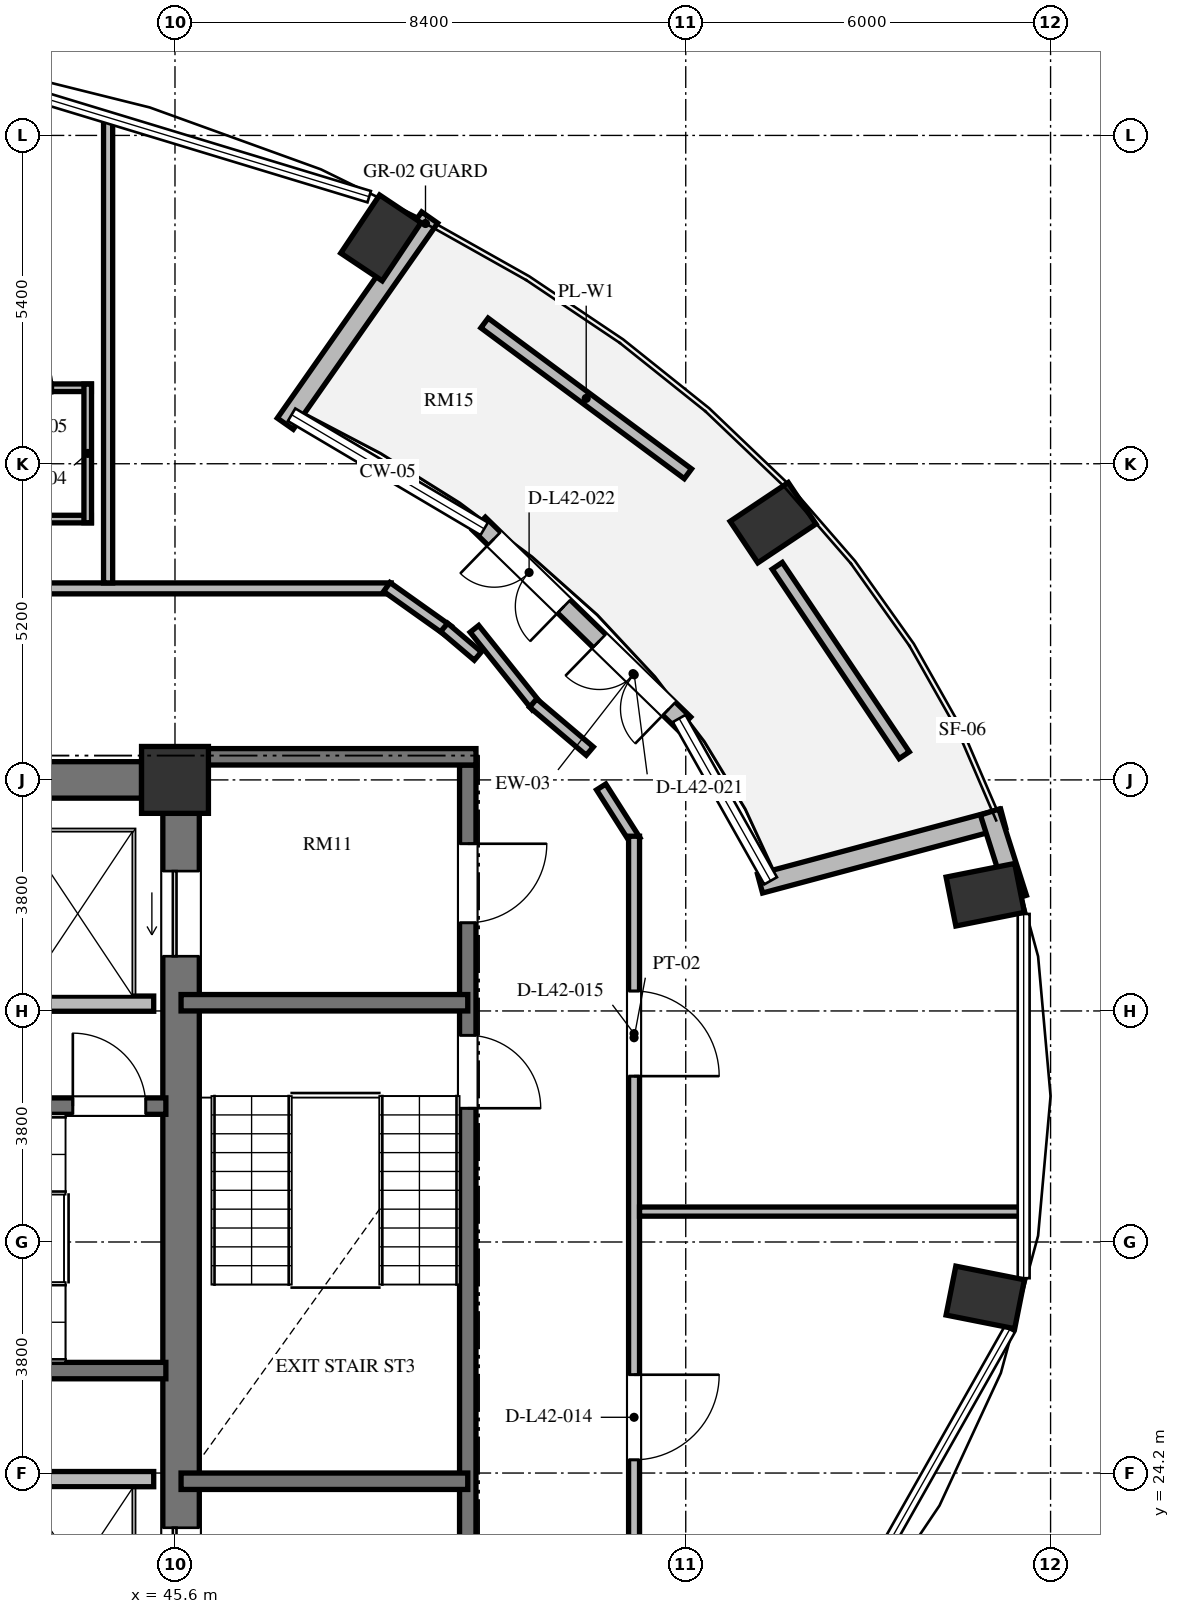
"""IFC4 building model, lengths in metres.
Left out: names, types, materials, properties, quantities, classifications, styles, units other than length and angle.
Written with IfcOpenShell. Run it as: python <this file> out.ifc"""

import sys

from ifc_helpers import new_model, si_unit, direction, frame, frame_2d, origin, origin_2d, place, context, subcontext, project, spatial, rectangle, extrude, element, fill, save


model = new_model("IFC4")
c1 = context("Model", 3, precision=1e-05, world=origin(), true_north=direction((0.0, 1.0)))
c2 = subcontext(c1, "Body", "Model", "MODEL_VIEW")
j1 = project(units=[si_unit("LENGTHUNIT", "METRE"), si_unit("PLANEANGLEUNIT", "RADIAN")], contexts=[c1])
p1 = place(None, origin())
s1 = spatial("IfcSite", under=j1, at=p1, CompositionType="ELEMENT")
p2 = place(p1, origin())
s2 = spatial("IfcBuilding", under=s1, at=p2, CompositionType="ELEMENT")
p3 = place(p2, frame((0.0, 0.0, 163.824)))
s3 = spatial("IfcBuildingStorey", under=s2, at=p3, CompositionType="ELEMENT", Elevation=163.824)
for number, where, z_axis, x_axis in (
    (1, (58.926, 27.088, 0.0), (0.0, 0.0, 1.0), (0.981, -0.195, 0.0)),
    (2, (58.926, 33.712, 0.0), (0.0, 0.0, 1.0), (0.981, 0.195, 0.0)),
    (3, (55.436, 39.831, 0.0), (0.0, 0.0, 1.0), (0.831, 0.556, 0.0)),
    (4, (48.987, 44.514, 0.0), (0.0, 0.0, 1.0), (0.556, 0.831, 0.0)),
):
    element("IfcColumn", number, at=place(p3, frame(where, z_axis=z_axis, x_axis=x_axis)), inside=s3, PredefinedType="COLUMN", context=c2, shape_type="SweptSolid", body=[
        extrude(rectangle(XDim=1.15, YDim=0.82, at=origin_2d()), origin(), (0.0, 0.0, 1.0), 3.648),
    ])
p4 = place(p3, frame((45.6, 35.6, 0.0), z_axis=(0.0, 0.0, 1.0), x_axis=(1.0, 0.0, 0.0)))
e5 = element("IfcColumn", 5, at=p4, inside=s3, PredefinedType="COLUMN", context=c2, shape_type="SweptSolid", body=[
    extrude(rectangle(XDim=1.1, YDim=1.1, at=origin_2d()), origin(), (0.0, 0.0, 1.0), 3.648),
])
p5 = place(p3, frame((45.7, 20.95, 0.0), z_axis=(0.0, 0.0, 1.0), x_axis=(0.0, 1.0, 0.0)))
e6 = element("IfcWall", 6, at=p5, inside=s3, PredefinedType="SHEAR", context=c2, shape_type="SweptSolid", body=[
    extrude(rectangle(XDim=14.1, YDim=0.6, at=frame_2d((7.05, 0.0))), origin(), (0.0, 0.0, 1.0), 3.648),
])
p6 = place(p5, frame((11.75, 0.0, 0.0)))
e7 = element("IfcOpeningElement", 7, at=p6, cuts=e6, PredefinedType="OPENING", context=c2, shape_type="SweptSolid", body=[
    extrude(rectangle(XDim=1.4, YDim=2.3, at=frame_2d((0.7, 1.15))), frame((0.0, 0.31, 0.0), z_axis=(0.0, -1.0, 0.0), x_axis=(1.0, 0.0, 0.0)), (0.0, 0.0, 1.0), 0.62),
])
p7 = place(p5, frame((0.95, 0.0, 0.0)))
e8 = element("IfcOpeningElement", 8, at=p7, cuts=e6, PredefinedType="OPENING", context=c2, shape_type="SweptSolid", body=[
    extrude(rectangle(XDim=1.4, YDim=2.3, at=frame_2d((0.7, 1.15))), frame((0.0, 0.31, 0.0), z_axis=(0.0, -1.0, 0.0), x_axis=(1.0, 0.0, 0.0)), (0.0, 0.0, 1.0), 0.62),
])
p8 = place(p3, frame((39.675, 35.6, 0.0), z_axis=(0.0, 0.0, 1.0), x_axis=(1.0, 0.0, 0.0)))
e9 = element("IfcWall", 9, at=p8, inside=s3, PredefinedType="SHEAR", context=c2, shape_type="SweptSolid", body=[
    extrude(rectangle(XDim=5.375, YDim=0.6, at=frame_2d((2.688, 0.0))), origin(), (0.0, 0.0, 1.0), 3.648),
])
p9 = place(p3, frame((53.977, 36.527, 0.0), z_axis=(0.0, 0.0, 1.0), x_axis=(-0.716702137791, 0.697379413007, 0.0)))
e10 = element("IfcWall", 10, at=p9, inside=s3, PredefinedType="SOLIDWALL", context=c2, shape_type="SweptSolid", body=[
    extrude(rectangle(XDim=4.713, YDim=0.3, at=frame_2d((2.356, 0.0))), origin(), (0.0, 0.0, 1.0), 3.428),
])
p10 = place(p9, frame((0.35, 0.0, 0.02)))
e11 = element("IfcOpeningElement", 11, at=p10, cuts=e10, PredefinedType="OPENING", context=c2, shape_type="SweptSolid", body=[
    extrude(rectangle(XDim=1.6, YDim=2.3, at=frame_2d((0.8, 1.15))), frame((0.0, 0.16, 0.0), z_axis=(0.0, -1.0, 0.0), x_axis=(1.0, 0.0, 0.0)), (0.0, 0.0, 1.0), 0.32),
])
p11 = place(p9, frame((2.763, 0.0, 0.02)))
e12 = element("IfcOpeningElement", 12, at=p11, cuts=e10, PredefinedType="OPENING", context=c2, shape_type="SweptSolid", body=[
    extrude(rectangle(XDim=1.6, YDim=2.3, at=frame_2d((0.8, 1.15))), frame((0.0, 0.16, 0.0), z_axis=(0.0, -1.0, 0.0), x_axis=(1.0, 0.0, 0.0)), (0.0, 0.0, 1.0), 0.32),
])
p12 = place(p3, frame((59.221, 34.966, 0.0), z_axis=(0.0, 0.0, 1.0), x_axis=(-0.965925940868, -0.258818617489, 0.0)))
e13 = element("IfcWall", 13, at=p12, inside=s3, PredefinedType="SOLIDWALL", context=c2, shape_type="SweptSolid", body=[
    extrude(rectangle(XDim=4.14, YDim=0.32, at=frame_2d((2.07, 0.0))), origin(), (0.0, 0.0, 1.0), 3.428),
])
p13 = place(p3, frame((49.789, 44.85, 0.0), z_axis=(0.0, 0.0, 1.0), x_axis=(-0.57355337011, -0.819168194961, 0.0)))
e14 = element("IfcWall", 14, at=p13, inside=s3, PredefinedType="SOLIDWALL", context=c2, shape_type="SweptSolid", body=[
    extrude(rectangle(XDim=4.14, YDim=0.32, at=frame_2d((2.07, 0.0))), origin(), (0.0, 0.0, 1.0), 3.428),
])
p14 = place(p3, frame((59.45, 33.654, 0.0), z_axis=(0.0, 0.0, 1.0), x_axis=(-0.303745470451, 0.952753215256, 0.0)))
e15 = element("IfcWall", 15, at=p14, inside=s3, PredefinedType="SOLIDWALL", context=c2, shape_type="SweptSolid", body=[
    extrude(rectangle(XDim=1.488, YDim=0.32, at=frame_2d((0.744, 0.0))), origin(), (0.0, 0.0, 1.0), 3.428),
])
p15 = place(p3, frame((57.593, 36.006, 0.0), z_axis=(0.0, 0.0, 1.0), x_axis=(-0.556861629804, 0.830605276441, 0.0)))
e16 = element("IfcWall", 16, at=p15, inside=s3, PredefinedType="PARAPET", context=c2, shape_type="SweptSolid", body=[
    extrude(rectangle(XDim=3.75, YDim=0.2, at=frame_2d((1.875, 0.0))), origin(), (0.0, 0.0, 1.0), 0.55),
])
p16 = place(p3, frame((54.035, 40.635, 0.0), z_axis=(0.0, 0.0, 1.0), x_axis=(-0.803273565066, 0.595610258194, 0.0)))
e17 = element("IfcWall", 17, at=p16, inside=s3, PredefinedType="PARAPET", context=c2, shape_type="SweptSolid", body=[
    extrude(rectangle(XDim=4.164, YDim=0.2, at=frame_2d((2.082, 0.0))), origin(), (0.0, 0.0, 1.0), 0.55),
])
p17 = place(p3, frame((37.465, 30.235, 0.0), z_axis=(0.0, 0.0, 1.0), x_axis=(1.0, 0.0, 0.0)))
e18 = element("IfcWall", 18, at=p17, inside=s3, PredefinedType="SHEAR", context=c2, shape_type="SweptSolid", body=[
    extrude(rectangle(XDim=7.985, YDim=0.27, at=frame_2d((3.992, 0.0))), origin(), (0.0, 0.0, 1.0), 3.648),
])
p18 = place(p17, frame((6.455, 0.0, 0.0)))
e19 = element("IfcOpeningElement", 19, at=p18, cuts=e18, PredefinedType="OPENING", context=c2, shape_type="SweptSolid", body=[
    extrude(rectangle(XDim=1.2, YDim=2.15, at=frame_2d((0.6, 1.075))), frame((0.0, 0.145, 0.0), z_axis=(0.0, -1.0, 0.0), x_axis=(1.0, 0.0, 0.0)), (0.0, 0.0, 1.0), 0.29),
])
p19 = place(p3, frame((37.465, 25.885, 0.0), z_axis=(0.0, 0.0, 1.0), x_axis=(1.0, 0.0, 0.0)))
e20 = element("IfcWall", 20, at=p19, inside=s3, PredefinedType="SHEAR", context=c2, shape_type="SweptSolid", body=[
    extrude(rectangle(XDim=7.985, YDim=0.27, at=frame_2d((3.992, 0.0))), origin(), (0.0, 0.0, 1.0), 3.648),
])
for number, where, z_axis, x_axis in (
    (21, (42.95, 31.92, 0.0), (0.0, 0.0, 1.0), (1.0, 0.0, 0.0)),
    (22, (42.95, 24.1, 0.0), (0.0, 0.0, 1.0), (1.0, 0.0, 0.0)),
):
    element("IfcWall", number, at=place(p3, frame(where, z_axis=z_axis, x_axis=x_axis)), inside=s3, PredefinedType="SOLIDWALL", context=c2, shape_type="SweptSolid", body=[
        extrude(rectangle(XDim=2.3, YDim=0.25, at=frame_2d((1.15, 0.0))), origin(), (0.0, 0.0, 1.0), 3.428),
    ])
p20 = place(p3, frame((50.415, 35.845, 0.0), z_axis=(0.0, 0.0, 1.0), x_axis=(0.0, -1.0, 0.0)))
e23 = element("IfcWall", 23, at=p20, inside=s3, PredefinedType="SHEAR", context=c2, shape_type="SweptSolid", body=[
    extrude(rectangle(XDim=15.825, YDim=0.27, at=frame_2d((7.913, 0.0))), origin(), (0.0, 0.0, 1.0), 3.648),
])
p21 = place(p20, frame((4.445, 0.0, 0.0)))
e24 = element("IfcOpeningElement", 24, at=p21, cuts=e23, PredefinedType="OPENING", context=c2, shape_type="SweptSolid", body=[
    extrude(rectangle(XDim=1.2, YDim=2.15, at=frame_2d((0.6, 1.075))), frame((0.0, 0.145, 0.0), z_axis=(0.0, -1.0, 0.0), x_axis=(1.0, 0.0, 0.0)), (0.0, 0.0, 1.0), 0.29),
])
p22 = place(p20, frame((1.295, 0.0, 0.0)))
e25 = element("IfcOpeningElement", 25, at=p22, cuts=e23, PredefinedType="OPENING", context=c2, shape_type="SweptSolid", body=[
    extrude(rectangle(XDim=1.3, YDim=2.2, at=frame_2d((0.65, 1.1))), frame((0.0, 0.145, 0.0), z_axis=(0.0, -1.0, 0.0), x_axis=(1.0, 0.0, 0.0)), (0.0, 0.0, 1.0), 0.29),
])
p23 = place(p20, frame((13.095, 0.0, 0.0)))
e26 = element("IfcOpeningElement", 26, at=p23, cuts=e23, PredefinedType="OPENING", context=c2, shape_type="SweptSolid", body=[
    extrude(rectangle(XDim=1.3, YDim=2.2, at=frame_2d((0.65, 1.1))), frame((0.0, 0.145, 0.0), z_axis=(0.0, -1.0, 0.0), x_axis=(1.0, 0.0, 0.0)), (0.0, 0.0, 1.0), 0.29),
])
p24 = place(p3, frame((46.0, 35.98, 0.0), z_axis=(0.0, 0.0, 1.0), x_axis=(1.0, 0.0, 0.0)))
e27 = element("IfcWall", 27, at=p24, inside=s3, PredefinedType="SHEAR", context=c2, shape_type="SweptSolid", body=[
    extrude(rectangle(XDim=4.55, YDim=0.27, at=frame_2d((2.275, 0.0))), origin(), (0.0, 0.0, 1.0), 3.648),
])
for number, where, z_axis, x_axis in (
    (28, (45.7, 31.935, 0.0), (0.0, 0.0, 1.0), (1.0, 0.0, 0.0)),
    (29, (45.7, 24.065, 0.0), (0.0, 0.0, 1.0), (1.0, 0.0, 0.0)),
):
    element("IfcWall", number, at=place(p3, frame(where, z_axis=z_axis, x_axis=x_axis)), inside=s3, PredefinedType="SHEAR", context=c2, shape_type="SweptSolid", body=[
        extrude(rectangle(XDim=4.715, YDim=0.27, at=frame_2d((2.357, 0.0))), origin(), (0.0, 0.0, 1.0), 3.648),
    ])
p25 = place(p3, frame((39.46, 38.75, 0.0), z_axis=(0.0, 0.0, 1.0), x_axis=(1.0, 0.0, 0.0)))
e30 = element("IfcWall", 30, at=p25, inside=s3, PredefinedType="PARTITIONING", context=c2, shape_type="SweptSolid", body=[
    extrude(rectangle(XDim=9.696, YDim=0.18, at=frame_2d((4.848, 0.0))), origin(), (0.0, 0.0, 1.0), 3.428),
])
p26 = place(p3, frame((49.083, 38.773, 0.0), z_axis=(0.0, 0.0, 1.0), x_axis=(0.815094383649, -0.579328184835, 0.0)))
e31 = element("IfcWall", 31, at=p26, inside=s3, PredefinedType="PARTITIONING", context=c2, shape_type="SweptSolid", body=[
    extrude(rectangle(XDim=1.234, YDim=0.18, at=frame_2d((0.617, 0.0))), origin(), (0.0, 0.0, 1.0), 3.428),
])
p27 = place(p3, frame((50.026, 38.107, 0.0), z_axis=(0.0, 0.0, 1.0), x_axis=(0.762519178552, -0.646965611405, 0.0)))
e32 = element("IfcWall", 32, at=p27, inside=s3, PredefinedType="PARTITIONING", context=c2, shape_type="SweptSolid", body=[
    extrude(rectangle(XDim=0.727, YDim=0.18, at=frame_2d((0.363, 0.0))), origin(), (0.0, 0.0, 1.0), 3.428),
])
p28 = place(p3, frame((50.525, 38.085, 0.0), z_axis=(0.0, 0.0, 1.0), x_axis=(0.624367263629, -0.781130923794, 0.0)))
e33 = element("IfcWall", 33, at=p28, inside=s3, PredefinedType="PARTITIONING", context=c2, shape_type="SweptSolid", body=[
    extrude(rectangle(XDim=1.635, YDim=0.18, at=frame_2d((0.818, 0.0))), origin(), (0.0, 0.0, 1.0), 3.428),
])
p29 = place(p3, frame((51.49, 36.865, 0.0), z_axis=(0.0, 0.0, 1.0), x_axis=(0.762506147444, -0.646980969666, 0.0)))
e34 = element("IfcWall", 34, at=p29, inside=s3, PredefinedType="PARTITIONING", context=c2, shape_type="SweptSolid", body=[
    extrude(rectangle(XDim=1.221, YDim=0.18, at=frame_2d((0.611, 0.0))), origin(), (0.0, 0.0, 1.0), 3.428),
])
p30 = place(p3, frame((52.609, 35.484, 0.0), z_axis=(0.0, 0.0, 1.0), x_axis=(0.536664379082, -0.843795795335, 0.0)))
e35 = element("IfcWall", 35, at=p30, inside=s3, PredefinedType="PARTITIONING", context=c2, shape_type="SweptSolid", body=[
    extrude(rectangle(XDim=1.048, YDim=0.18, at=frame_2d((0.524, 0.0))), origin(), (0.0, 0.0, 1.0), 3.428),
])
p31 = place(p3, frame((53.15, 34.674, 0.0), z_axis=(0.0, 0.0, 1.0), x_axis=(0.0, -1.0, 0.0)))
e36 = element("IfcWall", 36, at=p31, inside=s3, PredefinedType="PARTITIONING", context=c2, shape_type="SweptSolid", body=[
    extrude(rectangle(XDim=13.258, YDim=0.18, at=frame_2d((6.629, 0.0))), origin(), (0.0, 0.0, 1.0), 3.428),
])
p32 = place(p31, frame((8.857, 0.0, 0.0)))
e37 = element("IfcOpeningElement", 37, at=p32, cuts=e36, PredefinedType="OPENING", context=c2, shape_type="SweptSolid", body=[
    extrude(rectangle(XDim=1.4, YDim=2.2, at=frame_2d((0.7, 1.1))), frame((0.0, 0.1, 0.0), z_axis=(0.0, -1.0, 0.0), x_axis=(1.0, 0.0, 0.0)), (0.0, 0.0, 1.0), 0.2),
])
p33 = place(p31, frame((2.546, 0.0, 0.0)))
e38 = element("IfcOpeningElement", 38, at=p33, cuts=e36, PredefinedType="OPENING", context=c2, shape_type="SweptSolid", body=[
    extrude(rectangle(XDim=1.4, YDim=2.2, at=frame_2d((0.7, 1.1))), frame((0.0, 0.1, 0.0), z_axis=(0.0, -1.0, 0.0), x_axis=(1.0, 0.0, 0.0)), (0.0, 0.0, 1.0), 0.2),
])
p34 = place(p3, frame((53.24, 28.5, 0.0), z_axis=(0.0, 0.0, 1.0), x_axis=(1.0, 0.0, 0.0)))
e39 = element("IfcWall", 39, at=p34, inside=s3, PredefinedType="PARTITIONING", context=c2, shape_type="SweptSolid", body=[
    extrude(rectangle(XDim=6.307, YDim=0.15, at=frame_2d((3.154, 0.0))), origin(), (0.0, 0.0, 1.0), 3.428),
])
p35 = place(p3, frame((44.5, 38.84, 0.0), z_axis=(0.0, 0.0, 1.0), x_axis=(0.0, 1.0, 0.0)))
e40 = element("IfcWall", 40, at=p35, inside=s3, PredefinedType="PARTITIONING", context=c2, shape_type="SweptSolid", body=[
    extrude(rectangle(XDim=7.639, YDim=0.15, at=frame_2d((3.82, 0.0))), origin(), (0.0, 0.0, 1.0), 3.428),
])
p36 = place(p3, frame((42.005, 42.05, 0.0), z_axis=(0.0, 0.0, 1.0), x_axis=(1.0, 0.0, 0.0)))
e41 = element("IfcWall", 41, at=p36, inside=s3, PredefinedType="PARTITIONING", context=c2, shape_type="SweptSolid", body=[
    extrude(rectangle(XDim=2.22, YDim=0.125, at=frame_2d((1.11, 0.0))), origin(), (0.0, 0.0, 1.0), 3.428),
])
p37 = place(p36, frame((0.635, 0.0, 0.0)))
e42 = element("IfcOpeningElement", 42, at=p37, cuts=e41, PredefinedType="OPENING", context=c2, shape_type="SweptSolid", body=[
    extrude(rectangle(XDim=0.95, YDim=2.1, at=frame_2d((0.475, 1.05))), frame((0.0, 0.073, 0.0), z_axis=(0.0, -1.0, 0.0), x_axis=(1.0, 0.0, 0.0)), (0.0, 0.0, 1.0), 0.145),
])
p38 = place(p3, frame((42.005, 39.89, 0.0), z_axis=(0.0, 0.0, 1.0), x_axis=(1.0, 0.0, 0.0)))
e43 = element("IfcWall", 43, at=p38, inside=s3, PredefinedType="PARTITIONING", context=c2, shape_type="SweptSolid", body=[
    extrude(rectangle(XDim=2.22, YDim=0.125, at=frame_2d((1.11, 0.0))), origin(), (0.0, 0.0, 1.0), 3.428),
])
p39 = place(p3, frame((44.165, 39.83, 0.0), z_axis=(0.0, 0.0, 1.0), x_axis=(0.0, 1.0, 0.0)))
e44 = element("IfcWall", 44, at=p39, inside=s3, PredefinedType="PARTITIONING", context=c2, shape_type="SweptSolid", body=[
    extrude(rectangle(XDim=2.28, YDim=0.125, at=frame_2d((1.14, 0.0))), origin(), (0.0, 0.0, 1.0), 3.428),
])
p40 = place(p10, origin())
e45 = element("IfcDoor", 45, at=p40, inside=s3, OperationType="DOUBLE_DOOR_SINGLE_SWING", PredefinedType="DOOR", context=c2, shape_type="SweptSolid", body=[
    extrude(rectangle(XDim=1.6, YDim=2.3, at=frame_2d((0.8, 1.15))), frame((0.0, 0.025, 0.0), z_axis=(0.0, -1.0, 0.0), x_axis=(1.0, 0.0, 0.0)), (0.0, 0.0, 1.0), 0.05),
])
fill(e11, e45)
p41 = place(p11, origin())
e46 = element("IfcDoor", 46, at=p41, inside=s3, OperationType="DOUBLE_DOOR_SINGLE_SWING", PredefinedType="DOOR", context=c2, shape_type="SweptSolid", body=[
    extrude(rectangle(XDim=1.6, YDim=2.3, at=frame_2d((0.8, 1.15))), frame((0.0, 0.025, 0.0), z_axis=(0.0, -1.0, 0.0), x_axis=(1.0, 0.0, 0.0)), (0.0, 0.0, 1.0), 0.05),
])
fill(e12, e46)
p42 = place(p18, origin())
e47 = element("IfcDoor", 47, at=p42, inside=s3, OperationType="SINGLE_SWING_LEFT", PredefinedType="DOOR", context=c2, shape_type="SweptSolid", body=[
    extrude(rectangle(XDim=1.2, YDim=2.15, at=frame_2d((0.6, 1.075))), frame((0.0, 0.025, 0.0), z_axis=(0.0, -1.0, 0.0), x_axis=(1.0, 0.0, 0.0)), (0.0, 0.0, 1.0), 0.05),
])
fill(e19, e47)
p43 = place(p6, origin())
e48 = element("IfcDoor", 48, at=p43, inside=s3, OperationType="SLIDING_TO_LEFT", PredefinedType="DOOR", context=c2, shape_type="SweptSolid", body=[
    extrude(rectangle(XDim=1.4, YDim=2.3, at=frame_2d((0.7, 1.15))), frame((0.0, 0.025, 0.0), z_axis=(0.0, -1.0, 0.0), x_axis=(1.0, 0.0, 0.0)), (0.0, 0.0, 1.0), 0.05),
])
fill(e7, e48)
p44 = place(p7, origin())
e49 = element("IfcDoor", 49, at=p44, inside=s3, OperationType="SLIDING_TO_LEFT", PredefinedType="DOOR", context=c2, shape_type="SweptSolid", body=[
    extrude(rectangle(XDim=1.4, YDim=2.3, at=frame_2d((0.7, 1.15))), frame((0.0, 0.025, 0.0), z_axis=(0.0, -1.0, 0.0), x_axis=(1.0, 0.0, 0.0)), (0.0, 0.0, 1.0), 0.05),
])
fill(e8, e49)
p45 = place(p21, origin())
e50 = element("IfcDoor", 50, at=p45, inside=s3, OperationType="SINGLE_SWING_RIGHT", PredefinedType="DOOR", context=c2, shape_type="SweptSolid", body=[
    extrude(rectangle(XDim=1.2, YDim=2.15, at=frame_2d((0.6, 1.075))), frame((0.0, 0.025, 0.0), z_axis=(0.0, -1.0, 0.0), x_axis=(1.0, 0.0, 0.0)), (0.0, 0.0, 1.0), 0.05),
])
fill(e24, e50)
p46 = place(p22, origin())
e51 = element("IfcDoor", 51, at=p46, inside=s3, OperationType="SINGLE_SWING_LEFT", PredefinedType="DOOR", context=c2, shape_type="SweptSolid", body=[
    extrude(rectangle(XDim=1.3, YDim=2.2, at=frame_2d((0.65, 1.1))), frame((0.0, 0.025, 0.0), z_axis=(0.0, -1.0, 0.0), x_axis=(1.0, 0.0, 0.0)), (0.0, 0.0, 1.0), 0.05),
])
fill(e25, e51)
p47 = place(p32, origin())
e52 = element("IfcDoor", 52, at=p47, inside=s3, OperationType="SINGLE_SWING_LEFT", PredefinedType="DOOR", context=c2, shape_type="SweptSolid", body=[
    extrude(rectangle(XDim=1.4, YDim=2.2, at=frame_2d((0.7, 1.1))), frame((0.0, 0.025, 0.0), z_axis=(0.0, -1.0, 0.0), x_axis=(1.0, 0.0, 0.0)), (0.0, 0.0, 1.0), 0.05),
])
fill(e37, e52)
p48 = place(p33, origin())
e53 = element("IfcDoor", 53, at=p48, inside=s3, OperationType="SINGLE_SWING_RIGHT", PredefinedType="DOOR", context=c2, shape_type="SweptSolid", body=[
    extrude(rectangle(XDim=1.4, YDim=2.2, at=frame_2d((0.7, 1.1))), frame((0.0, 0.025, 0.0), z_axis=(0.0, -1.0, 0.0), x_axis=(1.0, 0.0, 0.0)), (0.0, 0.0, 1.0), 0.05),
])
fill(e38, e53)
p49 = place(p37, origin())
e54 = element("IfcDoor", 54, at=p49, inside=s3, OperationType="SINGLE_SWING_LEFT", PredefinedType="DOOR", context=c2, shape_type="SweptSolid", body=[
    extrude(rectangle(XDim=0.95, YDim=2.1, at=frame_2d((0.475, 1.05))), frame((0.0, 0.025, 0.0), z_axis=(0.0, -1.0, 0.0), x_axis=(1.0, 0.0, 0.0)), (0.0, 0.0, 1.0), 0.05),
])
fill(e42, e54)
save(model, sys.argv[1])
